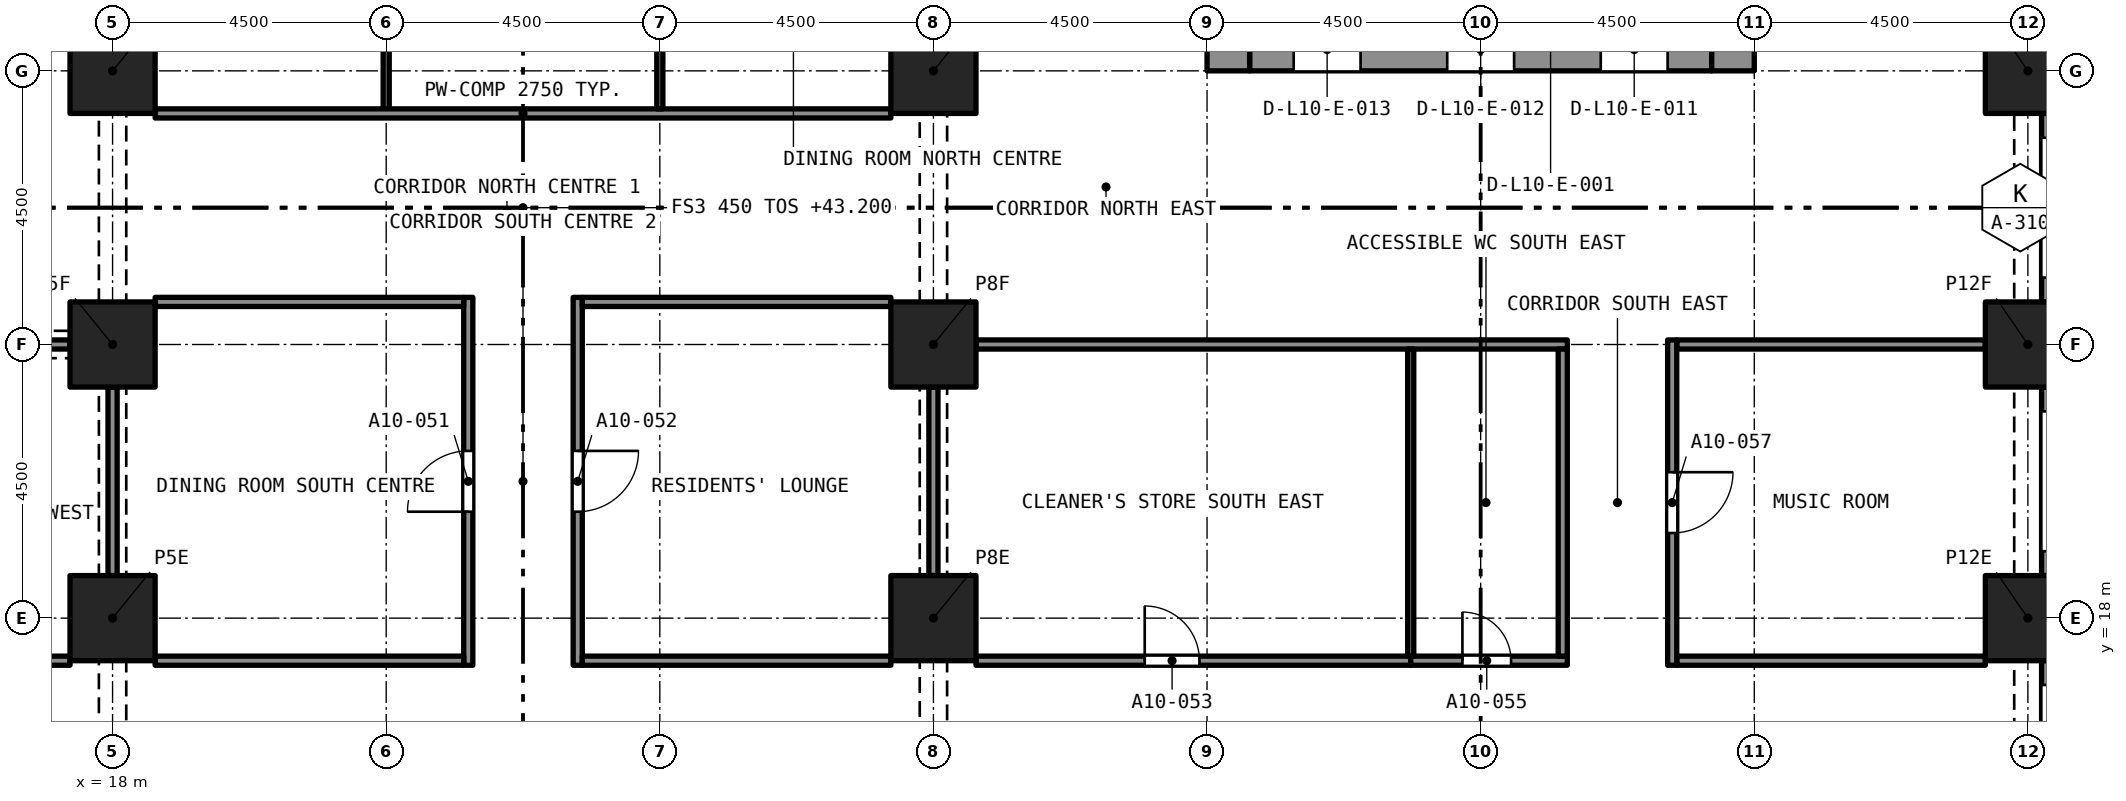
"""IFC4 building model, lengths in metres.
Left out: names, types, materials, properties, quantities, classifications, styles, units other than length and angle.
Written with IfcOpenShell. Run it as: python <this file> out.ifc"""

import sys

from ifc_helpers import new_model, si_unit, direction, frame, frame_2d, origin, origin_2d, place, context, subcontext, project, spatial, rectangle, extrude, element, fill, save


model = new_model("IFC4")
c1 = context("Model", 3, precision=1e-05, world=origin(), true_north=direction((0.0, 1.0)))
c2 = subcontext(c1, "Body", "Model", "MODEL_VIEW")
j1 = project(units=[si_unit("LENGTHUNIT", "METRE"), si_unit("PLANEANGLEUNIT", "RADIAN")], contexts=[c1])
p1 = place(None, origin())
s1 = spatial("IfcSite", under=j1, at=p1, CompositionType="ELEMENT")
p2 = place(p1, origin())
s2 = spatial("IfcBuilding", under=s1, at=p2, CompositionType="ELEMENT")
p3 = place(p2, frame((0.0, 0.0, 43.2)))
s3 = spatial("IfcBuildingStorey", under=s2, at=p3, CompositionType="ELEMENT", Elevation=43.2)
for number, where, z_axis, x_axis in (
    (1, (18.0, 18.0, 0.0), (0.0, 0.0, 1.0), (1.0, 0.0, 0.0)),
    (2, (31.5, 18.0, 0.0), (0.0, 0.0, 1.0), (1.0, 0.0, 0.0)),
    (3, (49.5, 18.0, 0.0), (0.0, 0.0, 1.0), (1.0, 0.0, 0.0)),
    (4, (18.0, 22.5, 0.0), (0.0, 0.0, 1.0), (1.0, 0.0, 0.0)),
    (5, (31.5, 22.5, 0.0), (0.0, 0.0, 1.0), (1.0, 0.0, 0.0)),
    (6, (49.5, 22.5, 0.0), (0.0, 0.0, 1.0), (1.0, 0.0, 0.0)),
    (7, (18.0, 27.0, 0.0), (0.0, 0.0, 1.0), (1.0, 0.0, 0.0)),
    (8, (31.5, 27.0, 0.0), (0.0, 0.0, 1.0), (1.0, 0.0, 0.0)),
    (9, (49.5, 27.0, 0.0), (0.0, 0.0, 1.0), (1.0, 0.0, 0.0)),
):
    element("IfcColumn", number, at=place(p3, frame(where, z_axis=z_axis, x_axis=x_axis)), inside=s3, PredefinedType="COLUMN", context=c2, shape_type="SweptSolid", body=[
        extrude(rectangle(XDim=1.4, YDim=1.4, at=origin_2d()), origin(), (0.0, 0.0, 1.0), 3.2),
    ])
p4 = place(p3, frame((36.7, 27.35, 0.0), z_axis=(0.0, 0.0, 1.0), x_axis=(1.0, 0.0, 0.0)))
e10 = element("IfcWall", 10, at=p4, inside=s3, PredefinedType="SOLIDWALL", context=c2, shape_type="SweptSolid", body=[
    extrude(rectangle(XDim=7.6, YDim=0.7, at=frame_2d((3.8, 0.0))), origin(), (0.0, 0.0, 1.0), 3.2),
])
p5 = place(p4, frame((5.775, 0.0, 0.0)))
e11 = element("IfcOpeningElement", 11, at=p5, cuts=e10, PredefinedType="OPENING", context=c2, shape_type="SweptSolid", body=[
    extrude(rectangle(XDim=1.1, YDim=2.1, at=frame_2d((0.55, 1.05))), frame((0.0, 0.36, 0.0), z_axis=(0.0, -1.0, 0.0), x_axis=(1.0, 0.0, 0.0)), (0.0, 0.0, 1.0), 0.72),
])
p6 = place(p4, frame((3.25, 0.0, 0.0)))
e12 = element("IfcOpeningElement", 12, at=p6, cuts=e10, PredefinedType="OPENING", context=c2, shape_type="SweptSolid", body=[
    extrude(rectangle(XDim=1.1, YDim=2.1, at=frame_2d((0.55, 1.05))), frame((0.0, 0.36, 0.0), z_axis=(0.0, -1.0, 0.0), x_axis=(1.0, 0.0, 0.0)), (0.0, 0.0, 1.0), 0.72),
])
p7 = place(p4, frame((0.725, 0.0, 0.0)))
e13 = element("IfcOpeningElement", 13, at=p7, cuts=e10, PredefinedType="OPENING", context=c2, shape_type="SweptSolid", body=[
    extrude(rectangle(XDim=1.1, YDim=2.1, at=frame_2d((0.55, 1.05))), frame((0.0, 0.36, 0.0), z_axis=(0.0, -1.0, 0.0), x_axis=(1.0, 0.0, 0.0)), (0.0, 0.0, 1.0), 0.72),
])
p8 = place(p3, frame((36.35, 27.0, 0.0), z_axis=(0.0, 0.0, 1.0), x_axis=(0.0, 1.0, 0.0)))
e14 = element("IfcWall", 14, at=p8, inside=s3, PredefinedType="SOLIDWALL", context=c2, shape_type="SweptSolid", body=[
    extrude(rectangle(XDim=13.5, YDim=0.7, at=frame_2d((6.75, 0.0))), origin(), (0.0, 0.0, 1.0), 3.2),
])
p9 = place(p8, frame((8.95, 0.0, 0.0)))
e15 = element("IfcOpeningElement", 15, at=p9, cuts=e14, PredefinedType="OPENING", context=c2, shape_type="SweptSolid", body=[
    extrude(rectangle(XDim=1.2, YDim=2.1, at=frame_2d((0.6, 1.05))), frame((0.0, 0.36, 0.0), z_axis=(0.0, -1.0, 0.0), x_axis=(1.0, 0.0, 0.0)), (0.0, 0.0, 1.0), 0.72),
])
p10 = place(p3, frame((44.65, 27.0, 0.0), z_axis=(0.0, 0.0, 1.0), x_axis=(0.0, 1.0, 0.0)))
e16 = element("IfcWall", 16, at=p10, inside=s3, PredefinedType="SOLIDWALL", context=c2, shape_type="SweptSolid", body=[
    extrude(rectangle(XDim=13.5, YDim=0.7, at=frame_2d((6.75, 0.0))), origin(), (0.0, 0.0, 1.0), 3.2),
])
p11 = place(p10, frame((8.95, 0.0, 0.0)))
e17 = element("IfcOpeningElement", 17, at=p11, cuts=e16, PredefinedType="OPENING", context=c2, shape_type="SweptSolid", body=[
    extrude(rectangle(XDim=1.2, YDim=2.1, at=frame_2d((0.6, 1.05))), frame((0.0, 0.36, 0.0), z_axis=(0.0, -1.0, 0.0), x_axis=(1.0, 0.0, 0.0)), (0.0, 0.0, 1.0), 0.72),
])
p12 = place(p3, frame((49.875, 17.3, 0.0), z_axis=(0.0, 0.0, 1.0), x_axis=(0.0, -1.0, 0.0)))
e18 = element("IfcWall", 18, at=p12, inside=s3, PredefinedType="SOLIDWALL", context=c2, shape_type="SweptSolid", body=[
    extrude(rectangle(XDim=3.1, YDim=0.3, at=frame_2d((1.55, 0.0))), origin(), (0.0, 0.0, 1.0), 3.2),
])
p13 = place(p12, frame((0.4, 0.0, 0.45)))
e19 = element("IfcOpeningElement", 19, at=p13, cuts=e18, PredefinedType="OPENING", context=c2, shape_type="SweptSolid", body=[
    extrude(rectangle(XDim=2.3, YDim=1.95, at=frame_2d((1.15, 0.975))), frame((0.0, 0.16, 0.0), z_axis=(0.0, -1.0, 0.0), x_axis=(1.0, 0.0, 0.0)), (0.0, 0.0, 1.0), 0.32),
])
p14 = place(p3, frame((49.875, 21.8, 0.0), z_axis=(0.0, 0.0, 1.0), x_axis=(0.0, -1.0, 0.0)))
e20 = element("IfcWall", 20, at=p14, inside=s3, PredefinedType="SOLIDWALL", context=c2, shape_type="SweptSolid", body=[
    extrude(rectangle(XDim=3.1, YDim=0.3, at=frame_2d((1.55, 0.0))), origin(), (0.0, 0.0, 1.0), 3.2),
])
p15 = place(p14, frame((0.4, 0.0, 0.45)))
e21 = element("IfcOpeningElement", 21, at=p15, cuts=e20, PredefinedType="OPENING", context=c2, shape_type="SweptSolid", body=[
    extrude(rectangle(XDim=2.3, YDim=1.95, at=frame_2d((1.15, 0.975))), frame((0.0, 0.16, 0.0), z_axis=(0.0, -1.0, 0.0), x_axis=(1.0, 0.0, 0.0)), (0.0, 0.0, 1.0), 0.32),
])
p16 = place(p3, frame((49.875, 26.3, 0.0), z_axis=(0.0, 0.0, 1.0), x_axis=(0.0, -1.0, 0.0)))
e22 = element("IfcWall", 22, at=p16, inside=s3, PredefinedType="SOLIDWALL", context=c2, shape_type="SweptSolid", body=[
    extrude(rectangle(XDim=3.1, YDim=0.3, at=frame_2d((1.55, 0.0))), origin(), (0.0, 0.0, 1.0), 3.2),
])
p17 = place(p16, frame((0.4, 0.0, 0.45)))
e23 = element("IfcOpeningElement", 23, at=p17, cuts=e22, PredefinedType="OPENING", context=c2, shape_type="SweptSolid", body=[
    extrude(rectangle(XDim=2.3, YDim=1.95, at=frame_2d((1.15, 0.975))), frame((0.0, 0.16, 0.0), z_axis=(0.0, -1.0, 0.0), x_axis=(1.0, 0.0, 0.0)), (0.0, 0.0, 1.0), 0.32),
])
p18 = place(p3, frame((23.85, 17.225, 0.0), z_axis=(0.0, 0.0, 1.0), x_axis=(0.0, 1.0, 0.0)))
e24 = element("IfcWall", 24, at=p18, inside=s3, PredefinedType="PARTITIONING", context=c2, shape_type="SweptSolid", body=[
    extrude(rectangle(XDim=6.05, YDim=0.15, at=frame_2d((3.025, 0.0))), origin(), (0.0, 0.0, 1.0), 2.75),
])
p19 = place(p18, frame((2.525, 0.0, 0.0)))
e25 = element("IfcOpeningElement", 25, at=p19, cuts=e24, PredefinedType="OPENING", context=c2, shape_type="SweptSolid", body=[
    extrude(rectangle(XDim=1.0, YDim=2.1, at=frame_2d((0.5, 1.05))), frame((0.0, 0.085, 0.0), z_axis=(0.0, -1.0, 0.0), x_axis=(1.0, 0.0, 0.0)), (0.0, 0.0, 1.0), 0.17),
])
p20 = place(p3, frame((25.65, 23.275, 0.0), z_axis=(0.0, 0.0, 1.0), x_axis=(0.0, -1.0, 0.0)))
e26 = element("IfcWall", 26, at=p20, inside=s3, PredefinedType="PARTITIONING", context=c2, shape_type="SweptSolid", body=[
    extrude(rectangle(XDim=6.05, YDim=0.15, at=frame_2d((3.025, 0.0))), origin(), (0.0, 0.0, 1.0), 2.75),
])
p21 = place(p20, frame((2.525, 0.0, 0.0)))
e27 = element("IfcOpeningElement", 27, at=p21, cuts=e26, PredefinedType="OPENING", context=c2, shape_type="SweptSolid", body=[
    extrude(rectangle(XDim=1.0, YDim=2.1, at=frame_2d((0.5, 1.05))), frame((0.0, 0.085, 0.0), z_axis=(0.0, -1.0, 0.0), x_axis=(1.0, 0.0, 0.0)), (0.0, 0.0, 1.0), 0.17),
])
for number, where, z_axis, x_axis in (
    (28, (18.7, 17.3, 0.0), (0.0, 0.0, 1.0), (1.0, 0.0, 0.0)),
    (29, (25.725, 17.3, 0.0), (0.0, 0.0, 1.0), (1.0, 0.0, 0.0)),
):
    element("IfcWall", number, at=place(p3, frame(where, z_axis=z_axis, x_axis=x_axis)), inside=s3, PredefinedType="PARTITIONING", context=c2, shape_type="SweptSolid", body=[
        extrude(rectangle(XDim=5.075, YDim=0.15, at=frame_2d((2.538, 0.0))), origin(), (0.0, 0.0, 1.0), 2.75),
    ])
p22 = place(p3, frame((32.2, 17.3, 0.0), z_axis=(0.0, 0.0, 1.0), x_axis=(1.0, 0.0, 0.0)))
e30 = element("IfcWall", 30, at=p22, inside=s3, PredefinedType="PARTITIONING", context=c2, shape_type="SweptSolid", body=[
    extrude(rectangle(XDim=7.15, YDim=0.15, at=frame_2d((3.575, 0.0))), origin(), (0.0, 0.0, 1.0), 2.9),
])
p23 = place(p22, frame((2.775, 0.0, 0.0)))
e31 = element("IfcOpeningElement", 31, at=p23, cuts=e30, PredefinedType="OPENING", context=c2, shape_type="SweptSolid", body=[
    extrude(rectangle(XDim=0.9, YDim=2.1, at=frame_2d((0.45, 1.05))), frame((0.0, 0.085, 0.0), z_axis=(0.0, -1.0, 0.0), x_axis=(1.0, 0.0, 0.0)), (0.0, 0.0, 1.0), 0.17),
])
p24 = place(p3, frame((10.15, 17.3, 0.0), z_axis=(0.0, 0.0, 1.0), x_axis=(1.0, 0.0, 0.0)))
e32 = element("IfcWall", 32, at=p24, inside=s3, PredefinedType="PARTITIONING", context=c2, shape_type="SweptSolid", body=[
    extrude(rectangle(XDim=7.15, YDim=0.15, at=frame_2d((3.575, 0.0))), origin(), (0.0, 0.0, 1.0), 2.9),
])
p25 = place(p24, frame((3.475, 0.0, 0.0)))
e33 = element("IfcOpeningElement", 33, at=p25, cuts=e32, PredefinedType="OPENING", context=c2, shape_type="SweptSolid", body=[
    extrude(rectangle(XDim=0.9, YDim=2.1, at=frame_2d((0.45, 1.05))), frame((0.0, 0.085, 0.0), z_axis=(0.0, -1.0, 0.0), x_axis=(1.0, 0.0, 0.0)), (0.0, 0.0, 1.0), 0.17),
])
p26 = place(p3, frame((39.35, 17.3, 0.0), z_axis=(0.0, 0.0, 1.0), x_axis=(1.0, 0.0, 0.0)))
e34 = element("IfcWall", 34, at=p26, inside=s3, PredefinedType="PARTITIONING", context=c2, shape_type="SweptSolid", body=[
    extrude(rectangle(XDim=2.575, YDim=0.15, at=frame_2d((1.288, 0.0))), origin(), (0.0, 0.0, 1.0), 2.9),
])
p27 = place(p26, frame((0.85, 0.0, 0.0)))
e35 = element("IfcOpeningElement", 35, at=p27, cuts=e34, PredefinedType="OPENING", context=c2, shape_type="SweptSolid", body=[
    extrude(rectangle(XDim=0.8, YDim=2.1, at=frame_2d((0.4, 1.05))), frame((0.0, 0.085, 0.0), z_axis=(0.0, -1.0, 0.0), x_axis=(1.0, 0.0, 0.0)), (0.0, 0.0, 1.0), 0.17),
])
p28 = place(p3, frame((43.725, 17.3, 0.0), z_axis=(0.0, 0.0, 1.0), x_axis=(1.0, 0.0, 0.0)))
e36 = element("IfcWall", 36, at=p28, inside=s3, PredefinedType="PARTITIONING", context=c2, shape_type="SweptSolid", body=[
    extrude(rectangle(XDim=5.075, YDim=0.15, at=frame_2d((2.538, 0.0))), origin(), (0.0, 0.0, 1.0), 2.9),
])
p29 = place(p3, frame((22.5, 26.375, 0.0), z_axis=(0.0, 0.0, 1.0), x_axis=(0.0, 1.0, 0.0)))
e37 = element("IfcWall", 37, at=p29, inside=s3, PredefinedType="PARTITIONING", context=c2, shape_type="SweptSolid", body=[
    extrude(rectangle(XDim=10.25, YDim=0.1, at=frame_2d((5.125, 0.0))), origin(), (0.0, 0.0, 1.0), 2.75),
])
p30 = place(p3, frame((18.7, 26.3, 0.0), z_axis=(0.0, 0.0, 1.0), x_axis=(1.0, 0.0, 0.0)))
e38 = element("IfcWall", 38, at=p30, inside=s3, PredefinedType="PARTITIONING", context=c2, shape_type="SweptSolid", body=[
    extrude(rectangle(XDim=12.1, YDim=0.15, at=frame_2d((6.05, 0.0))), origin(), (0.0, 0.0, 1.0), 2.75),
])
p31 = place(p3, frame((27.0, 26.375, 0.0), z_axis=(0.0, 0.0, 1.0), x_axis=(0.0, 1.0, 0.0)))
e39 = element("IfcWall", 39, at=p31, inside=s3, PredefinedType="PARTITIONING", context=c2, shape_type="SweptSolid", body=[
    extrude(rectangle(XDim=10.25, YDim=0.1, at=frame_2d((5.125, 0.0))), origin(), (0.0, 0.0, 1.0), 2.75),
])
p32 = place(p3, frame((18.7, 23.2, 0.0), z_axis=(0.0, 0.0, 1.0), x_axis=(1.0, 0.0, 0.0)))
e40 = element("IfcWall", 40, at=p32, inside=s3, PredefinedType="PARTITIONING", context=c2, shape_type="SweptSolid", body=[
    extrude(rectangle(XDim=5.075, YDim=0.15, at=frame_2d((2.538, 0.0))), origin(), (0.0, 0.0, 1.0), 2.75),
])
p33 = place(p3, frame((18.0, 18.7, 0.0), z_axis=(0.0, 0.0, 1.0), x_axis=(0.0, 1.0, 0.0)))
e41 = element("IfcWall", 41, at=p33, inside=s3, PredefinedType="PARTITIONING", context=c2, shape_type="SweptSolid", body=[
    extrude(rectangle(XDim=3.1, YDim=0.15, at=frame_2d((1.55, 0.0))), origin(), (0.0, 0.0, 1.0), 2.38),
])
p34 = place(p3, frame((25.725, 23.2, 0.0), z_axis=(0.0, 0.0, 1.0), x_axis=(1.0, 0.0, 0.0)))
e42 = element("IfcWall", 42, at=p34, inside=s3, PredefinedType="PARTITIONING", context=c2, shape_type="SweptSolid", body=[
    extrude(rectangle(XDim=5.075, YDim=0.15, at=frame_2d((2.538, 0.0))), origin(), (0.0, 0.0, 1.0), 2.75),
])
p35 = place(p3, frame((31.5, 18.7, 0.0), z_axis=(0.0, 0.0, 1.0), x_axis=(0.0, 1.0, 0.0)))
e43 = element("IfcWall", 43, at=p35, inside=s3, PredefinedType="PARTITIONING", context=c2, shape_type="SweptSolid", body=[
    extrude(rectangle(XDim=3.1, YDim=0.15, at=frame_2d((1.55, 0.0))), origin(), (0.0, 0.0, 1.0), 2.38),
])
p36 = place(p3, frame((32.2, 22.5, 0.0), z_axis=(0.0, 0.0, 1.0), x_axis=(1.0, 0.0, 0.0)))
e44 = element("IfcWall", 44, at=p36, inside=s3, PredefinedType="PARTITIONING", context=c2, shape_type="SweptSolid", body=[
    extrude(rectangle(XDim=9.725, YDim=0.15, at=frame_2d((4.863, 0.0))), origin(), (0.0, 0.0, 1.0), 2.9),
])
p37 = place(p3, frame((43.725, 22.5, 0.0), z_axis=(0.0, 0.0, 1.0), x_axis=(1.0, 0.0, 0.0)))
e45 = element("IfcWall", 45, at=p37, inside=s3, PredefinedType="PARTITIONING", context=c2, shape_type="SweptSolid", body=[
    extrude(rectangle(XDim=5.075, YDim=0.15, at=frame_2d((2.538, 0.0))), origin(), (0.0, 0.0, 1.0), 2.9),
])
p38 = place(p3, frame((14.2, 22.5, 0.0), z_axis=(0.0, 0.0, 1.0), x_axis=(1.0, 0.0, 0.0)))
e46 = element("IfcWall", 46, at=p38, inside=s3, PredefinedType="PARTITIONING", context=c2, shape_type="SweptSolid", body=[
    extrude(rectangle(XDim=3.1, YDim=0.15, at=frame_2d((1.55, 0.0))), origin(), (0.0, 0.0, 1.0), 2.38),
])
p39 = place(p3, frame((41.85, 17.375, 0.0), z_axis=(0.0, 0.0, 1.0), x_axis=(0.0, 1.0, 0.0)))
e47 = element("IfcWall", 47, at=p39, inside=s3, PredefinedType="PARTITIONING", context=c2, shape_type="SweptSolid", body=[
    extrude(rectangle(XDim=5.05, YDim=0.15, at=frame_2d((2.525, 0.0))), origin(), (0.0, 0.0, 1.0), 2.9),
])
p40 = place(p3, frame((43.65, 22.575, 0.0), z_axis=(0.0, 0.0, 1.0), x_axis=(0.0, -1.0, 0.0)))
e48 = element("IfcWall", 48, at=p40, inside=s3, PredefinedType="PARTITIONING", context=c2, shape_type="SweptSolid", body=[
    extrude(rectangle(XDim=5.35, YDim=0.15, at=frame_2d((2.675, 0.0))), origin(), (0.0, 0.0, 1.0), 2.9),
])
p41 = place(p40, frame((2.175, 0.0, 0.0)))
e49 = element("IfcOpeningElement", 49, at=p41, cuts=e48, PredefinedType="OPENING", context=c2, shape_type="SweptSolid", body=[
    extrude(rectangle(XDim=1.0, YDim=2.1, at=frame_2d((0.5, 1.05))), frame((0.0, 0.085, 0.0), z_axis=(0.0, -1.0, 0.0), x_axis=(1.0, 0.0, 0.0)), (0.0, 0.0, 1.0), 0.17),
])
p42 = place(p3, frame((39.35, 17.375, 0.0), z_axis=(0.0, 0.0, 1.0), x_axis=(0.0, 1.0, 0.0)))
e50 = element("IfcWall", 50, at=p42, inside=s3, PredefinedType="PARTITIONING", context=c2, shape_type="SweptSolid", body=[
    extrude(rectangle(XDim=5.05, YDim=0.1, at=frame_2d((2.525, 0.0))), origin(), (0.0, 0.0, 1.0), 2.9),
])
p43 = place(p19, origin())
e51 = element("IfcDoor", 51, at=p43, inside=s3, OperationType="SINGLE_SWING_RIGHT", PredefinedType="DOOR", context=c2, shape_type="SweptSolid", body=[
    extrude(rectangle(XDim=1.0, YDim=2.1, at=frame_2d((0.5, 1.05))), frame((0.0, 0.025, 0.0), z_axis=(0.0, -1.0, 0.0), x_axis=(1.0, 0.0, 0.0)), (0.0, 0.0, 1.0), 0.05),
])
fill(e25, e51)
p44 = place(p21, origin())
e52 = element("IfcDoor", 52, at=p44, inside=s3, OperationType="SINGLE_SWING_RIGHT", PredefinedType="DOOR", context=c2, shape_type="SweptSolid", body=[
    extrude(rectangle(XDim=1.0, YDim=2.1, at=frame_2d((0.5, 1.05))), frame((0.0, 0.025, 0.0), z_axis=(0.0, -1.0, 0.0), x_axis=(1.0, 0.0, 0.0)), (0.0, 0.0, 1.0), 0.05),
])
fill(e27, e52)
p45 = place(p23, origin())
e53 = element("IfcDoor", 53, at=p45, inside=s3, OperationType="SINGLE_SWING_LEFT", PredefinedType="DOOR", context=c2, shape_type="SweptSolid", body=[
    extrude(rectangle(XDim=0.9, YDim=2.1, at=frame_2d((0.45, 1.05))), frame((0.0, 0.025, 0.0), z_axis=(0.0, -1.0, 0.0), x_axis=(1.0, 0.0, 0.0)), (0.0, 0.0, 1.0), 0.05),
])
fill(e31, e53)
p46 = place(p27, origin())
e54 = element("IfcDoor", 54, at=p46, inside=s3, OperationType="SINGLE_SWING_LEFT", PredefinedType="DOOR", context=c2, shape_type="SweptSolid", body=[
    extrude(rectangle(XDim=0.8, YDim=2.1, at=frame_2d((0.4, 1.05))), frame((0.0, 0.025, 0.0), z_axis=(0.0, -1.0, 0.0), x_axis=(1.0, 0.0, 0.0)), (0.0, 0.0, 1.0), 0.05),
])
fill(e35, e54)
p47 = place(p41, origin())
e55 = element("IfcDoor", 55, at=p47, inside=s3, OperationType="SINGLE_SWING_RIGHT", PredefinedType="DOOR", context=c2, shape_type="SweptSolid", body=[
    extrude(rectangle(XDim=1.0, YDim=2.1, at=frame_2d((0.5, 1.05))), frame((0.0, 0.025, 0.0), z_axis=(0.0, -1.0, 0.0), x_axis=(1.0, 0.0, 0.0)), (0.0, 0.0, 1.0), 0.05),
])
fill(e49, e55)
save(model, sys.argv[1])
